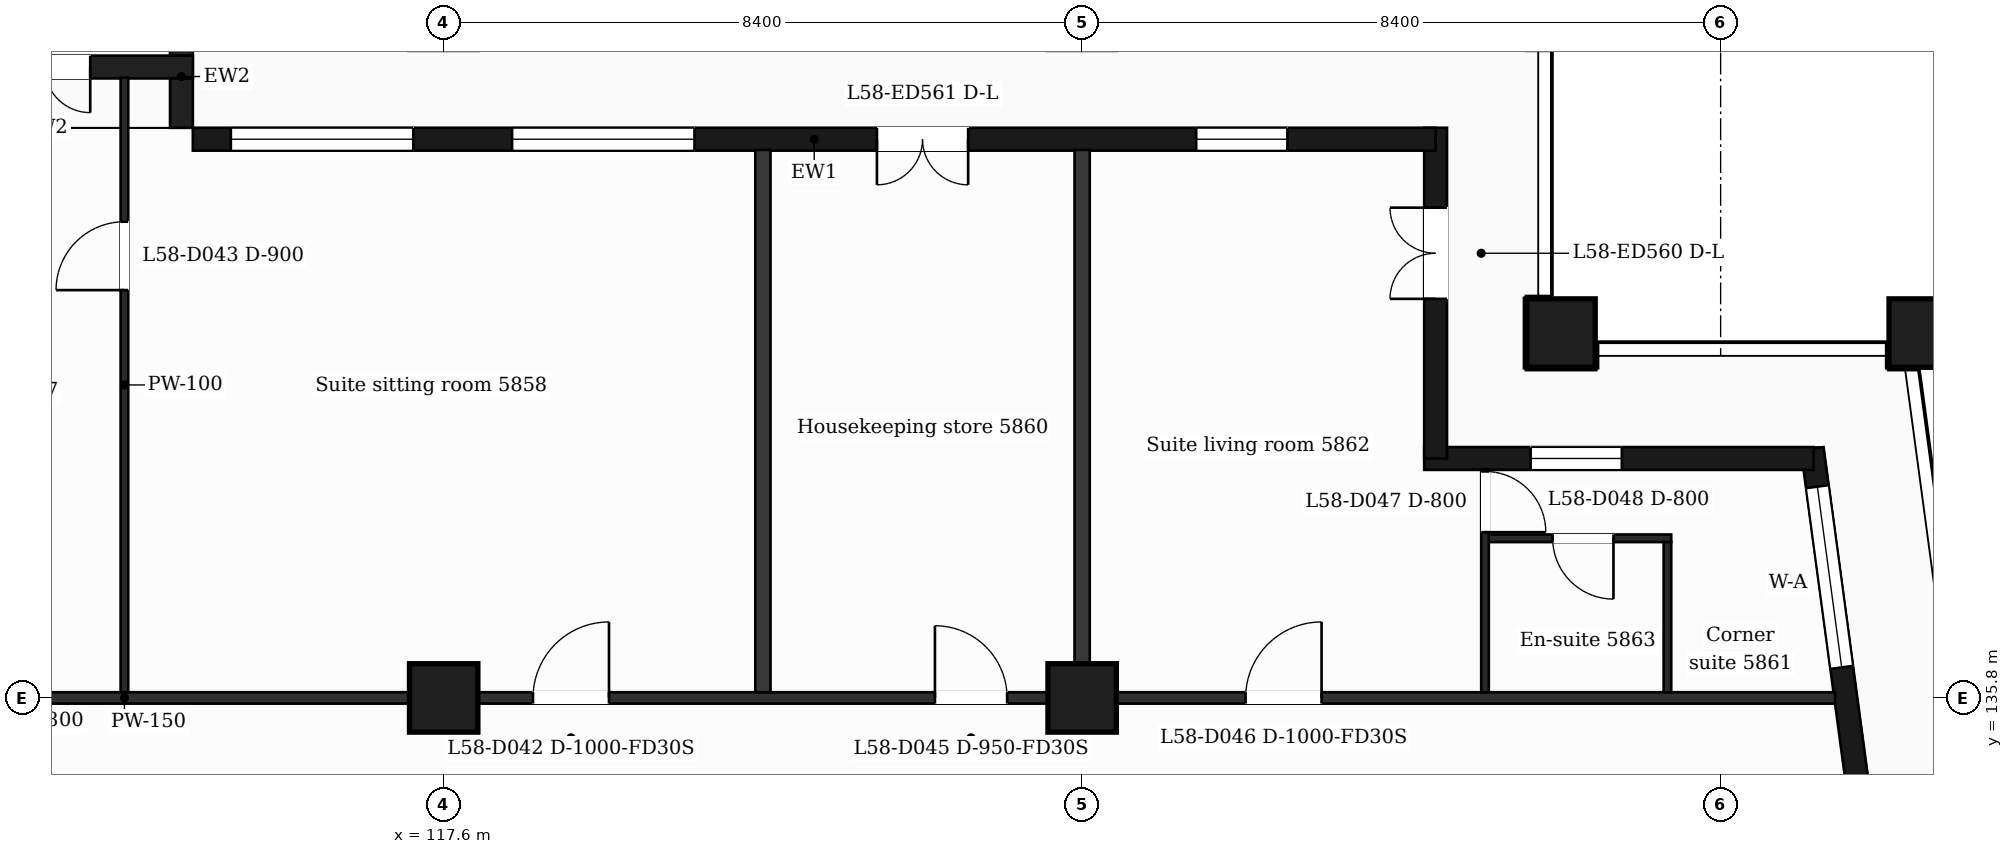
"""IFC4 building model, lengths in metres.
Left out: names, types, materials, properties, quantities, classifications, styles, units other than length and angle.
Written with IfcOpenShell. Run it as: python <this file> out.ifc"""

import sys

from ifc_helpers import new_model, si_unit, direction, frame, frame_2d, origin, origin_2d, place, context, subcontext, project, spatial, rectangle, extrude, element, fill, save


model = new_model("IFC4")
c1 = context("Model", 3, precision=1e-05, world=origin(), true_north=direction((0.0, 1.0)))
c2 = subcontext(c1, "Body", "Model", "MODEL_VIEW")
j1 = project(units=[si_unit("LENGTHUNIT", "METRE"), si_unit("PLANEANGLEUNIT", "RADIAN")], contexts=[c1])
p1 = place(None, origin())
s1 = spatial("IfcSite", under=j1, at=p1, CompositionType="ELEMENT")
p2 = place(p1, origin())
s2 = spatial("IfcBuilding", under=s1, at=p2, CompositionType="ELEMENT")
p3 = place(p2, frame((0.0, 0.0, 239.2)))
s3 = spatial("IfcBuildingStorey", under=s2, at=p3, CompositionType="ELEMENT", Elevation=239.2)
for number, where, z_axis, x_axis in (
    (1, (132.3, 140.6, 0.0), (0.0, 0.0, 1.0), (1.0, 0.0, 0.0)),
    (2, (137.065, 140.6, 0.0), (0.0, 0.0, 1.0), (1.0, 0.0, 0.0)),
    (3, (117.6, 135.8, 0.0), (0.0, 0.0, 1.0), (1.0, 0.0, 0.0)),
    (4, (126.0, 135.8, 0.0), (0.0, 0.0, 1.0), (1.0, 0.0, 0.0)),
):
    element("IfcColumn", number, at=place(p3, frame(where, z_axis=z_axis, x_axis=x_axis)), inside=s3, PredefinedType="COLUMN", context=c2, shape_type="SweptSolid", body=[
        extrude(rectangle(XDim=0.9, YDim=0.9, at=origin_2d()), origin(), (0.0, 0.0, 1.0), 3.7),
    ])
p4 = place(p3, frame((136.504, 132.4, 0.0), z_axis=(0.0, 0.0, 1.0), x_axis=(-0.133399697462, 0.99106231929, 0.0)))
e5 = element("IfcWall", 5, at=p4, inside=s3, PredefinedType="SOLIDWALL", context=c2, shape_type="SweptSolid", body=[
    extrude(rectangle(XDim=6.74, YDim=0.3, at=frame_2d((3.37, 0.0))), origin(), (0.0, 0.0, 1.0), 3.38),
])
p5 = place(p4, frame((1.115, 0.0, 0.0)))
e6 = element("IfcOpeningElement", 6, at=p5, cuts=e5, PredefinedType="OPENING", context=c2, shape_type="SweptSolid", body=[
    extrude(rectangle(XDim=1.2, YDim=2.4, at=frame_2d((0.6, 1.2))), frame((0.0, 0.16, 0.0), z_axis=(0.0, -1.0, 0.0), x_axis=(1.0, 0.0, 0.0)), (0.0, 0.0, 1.0), 0.32),
])
p6 = place(p4, frame((3.835, 0.0, 0.9)))
e7 = element("IfcOpeningElement", 7, at=p6, cuts=e5, PredefinedType="OPENING", context=c2, shape_type="SweptSolid", body=[
    extrude(rectangle(XDim=2.4, YDim=2.1, at=frame_2d((1.2, 1.05))), frame((0.0, 0.16, 0.0), z_axis=(0.0, -1.0, 0.0), x_axis=(1.0, 0.0, 0.0)), (0.0, 0.0, 1.0), 0.32),
])
p7 = place(p3, frame((135.623, 138.95, 0.0), z_axis=(0.0, 0.0, 1.0), x_axis=(-1.0, 0.0, 0.0)))
e8 = element("IfcWall", 8, at=p7, inside=s3, PredefinedType="SOLIDWALL", context=c2, shape_type="SweptSolid", body=[
    extrude(rectangle(XDim=5.123, YDim=0.3, at=frame_2d((2.561, 0.0))), origin(), (0.0, 0.0, 1.0), 3.38),
])
p8 = place(p7, frame((2.523, 0.0, 0.9)))
e9 = element("IfcOpeningElement", 9, at=p8, cuts=e8, PredefinedType="OPENING", context=c2, shape_type="SweptSolid", body=[
    extrude(rectangle(XDim=1.2, YDim=2.1, at=frame_2d((0.6, 1.05))), frame((0.0, 0.16, 0.0), z_axis=(0.0, -1.0, 0.0), x_axis=(1.0, 0.0, 0.0)), (0.0, 0.0, 1.0), 0.32),
])
p9 = place(p3, frame((130.65, 138.95, 0.0), z_axis=(0.0, 0.0, 1.0), x_axis=(0.0, 1.0, 0.0)))
e10 = element("IfcWall", 10, at=p9, inside=s3, PredefinedType="SOLIDWALL", context=c2, shape_type="SweptSolid", body=[
    extrude(rectangle(XDim=4.35, YDim=0.3, at=frame_2d((2.175, 0.0))), origin(), (0.0, 0.0, 1.0), 3.38),
])
p10 = place(p9, frame((2.1, 0.0, 0.0)))
e11 = element("IfcOpeningElement", 11, at=p10, cuts=e10, PredefinedType="OPENING", context=c2, shape_type="SweptSolid", body=[
    extrude(rectangle(XDim=1.2, YDim=2.4, at=frame_2d((0.6, 1.2))), frame((0.0, 0.16, 0.0), z_axis=(0.0, -1.0, 0.0), x_axis=(1.0, 0.0, 0.0)), (0.0, 0.0, 1.0), 0.32),
])
p11 = place(p3, frame((130.65, 143.15, 0.0), z_axis=(0.0, 0.0, 1.0), x_axis=(-1.0, 0.0, 0.0)))
e12 = element("IfcWall", 12, at=p11, inside=s3, PredefinedType="SOLIDWALL", context=c2, shape_type="SweptSolid", body=[
    extrude(rectangle(XDim=16.35, YDim=0.3, at=frame_2d((8.175, 0.0))), origin(), (0.0, 0.0, 1.0), 3.38),
])
p12 = place(p11, frame((1.95, 0.0, 0.9)))
e13 = element("IfcOpeningElement", 13, at=p12, cuts=e12, PredefinedType="OPENING", context=c2, shape_type="SweptSolid", body=[
    extrude(rectangle(XDim=1.2, YDim=2.1, at=frame_2d((0.6, 1.05))), frame((0.0, 0.16, 0.0), z_axis=(0.0, -1.0, 0.0), x_axis=(1.0, 0.0, 0.0)), (0.0, 0.0, 1.0), 0.32),
])
p13 = place(p11, frame((6.15, 0.0, 0.0)))
e14 = element("IfcOpeningElement", 14, at=p13, cuts=e12, PredefinedType="OPENING", context=c2, shape_type="SweptSolid", body=[
    extrude(rectangle(XDim=1.2, YDim=2.4, at=frame_2d((0.6, 1.2))), frame((0.0, 0.16, 0.0), z_axis=(0.0, -1.0, 0.0), x_axis=(1.0, 0.0, 0.0)), (0.0, 0.0, 1.0), 0.32),
])
p14 = place(p11, frame((9.75, 0.0, 0.9)))
e15 = element("IfcOpeningElement", 15, at=p14, cuts=e12, PredefinedType="OPENING", context=c2, shape_type="SweptSolid", body=[
    extrude(rectangle(XDim=2.4, YDim=2.1, at=frame_2d((1.2, 1.05))), frame((0.0, 0.16, 0.0), z_axis=(0.0, -1.0, 0.0), x_axis=(1.0, 0.0, 0.0)), (0.0, 0.0, 1.0), 0.32),
])
p15 = place(p11, frame((13.45, 0.0, 0.9)))
e16 = element("IfcOpeningElement", 16, at=p15, cuts=e12, PredefinedType="OPENING", context=c2, shape_type="SweptSolid", body=[
    extrude(rectangle(XDim=2.4, YDim=2.1, at=frame_2d((1.2, 1.05))), frame((0.0, 0.16, 0.0), z_axis=(0.0, -1.0, 0.0), x_axis=(1.0, 0.0, 0.0)), (0.0, 0.0, 1.0), 0.32),
])
p16 = place(p3, frame((114.15, 143.3, 0.0), z_axis=(0.0, 0.0, 1.0), x_axis=(0.0, 1.0, 0.0)))
e17 = element("IfcWall", 17, at=p16, inside=s3, PredefinedType="SOLIDWALL", context=c2, shape_type="SweptSolid", body=[
    extrude(rectangle(XDim=1.35, YDim=0.3, at=frame_2d((0.675, 0.0))), origin(), (0.0, 0.0, 1.0), 3.38),
])
p17 = place(p3, frame((114.3, 144.1, 0.0), z_axis=(0.0, 0.0, 1.0), x_axis=(-1.0, 0.0, 0.0)))
e18 = element("IfcWall", 18, at=p17, inside=s3, PredefinedType="SOLIDWALL", context=c2, shape_type="SweptSolid", body=[
    extrude(rectangle(XDim=3.9, YDim=0.3, at=frame_2d((1.95, 0.0))), origin(), (0.0, 0.0, 1.0), 3.38),
])
p18 = place(p17, frame((1.35, 0.0, 0.0)))
e19 = element("IfcOpeningElement", 19, at=p18, cuts=e18, PredefinedType="OPENING", context=c2, shape_type="SweptSolid", body=[
    extrude(rectangle(XDim=1.2, YDim=2.4, at=frame_2d((0.6, 1.2))), frame((0.0, 0.16, 0.0), z_axis=(0.0, -1.0, 0.0), x_axis=(1.0, 0.0, 0.0)), (0.0, 0.0, 1.0), 0.32),
])
p19 = place(p3, frame((90.895, 135.8, 0.0), z_axis=(0.0, 0.0, 1.0), x_axis=(1.0, 0.0, 0.0)))
e20 = element("IfcWall", 20, at=p19, inside=s3, PredefinedType="PARTITIONING", context=c2, shape_type="SweptSolid", body=[
    extrude(rectangle(XDim=45.011, YDim=0.15, at=frame_2d((22.505, 0.0))), origin(), (0.0, 0.0, 1.0), 3.38),
])
p20 = place(p19, frame((7.455, 0.0, 0.0)))
e21 = element("IfcOpeningElement", 21, at=p20, cuts=e20, PredefinedType="OPENING", context=c2, shape_type="SweptSolid", body=[
    extrude(rectangle(XDim=1.0, YDim=2.1, at=frame_2d((0.5, 1.05))), frame((0.0, 0.085, 0.0), z_axis=(0.0, -1.0, 0.0), x_axis=(1.0, 0.0, 0.0)), (0.0, 0.0, 1.0), 0.17),
])
p21 = place(p19, frame((10.88, 0.0, 0.0)))
e22 = element("IfcOpeningElement", 22, at=p21, cuts=e20, PredefinedType="OPENING", context=c2, shape_type="SweptSolid", body=[
    extrude(rectangle(XDim=1.0, YDim=2.1, at=frame_2d((0.5, 1.05))), frame((0.0, 0.085, 0.0), z_axis=(0.0, -1.0, 0.0), x_axis=(1.0, 0.0, 0.0)), (0.0, 0.0, 1.0), 0.17),
])
p22 = place(p19, frame((27.88, 0.0, 0.0)))
e23 = element("IfcOpeningElement", 23, at=p22, cuts=e20, PredefinedType="OPENING", context=c2, shape_type="SweptSolid", body=[
    extrude(rectangle(XDim=1.0, YDim=2.1, at=frame_2d((0.5, 1.05))), frame((0.0, 0.085, 0.0), z_axis=(0.0, -1.0, 0.0), x_axis=(1.0, 0.0, 0.0)), (0.0, 0.0, 1.0), 0.17),
])
p23 = place(p19, frame((33.168, 0.0, 0.0)))
e24 = element("IfcOpeningElement", 24, at=p23, cuts=e20, PredefinedType="OPENING", context=c2, shape_type="SweptSolid", body=[
    extrude(rectangle(XDim=0.95, YDim=2.1, at=frame_2d((0.475, 1.05))), frame((0.0, 0.085, 0.0), z_axis=(0.0, -1.0, 0.0), x_axis=(1.0, 0.0, 0.0)), (0.0, 0.0, 1.0), 0.17),
])
p24 = place(p19, frame((37.255, 0.0, 0.0)))
e25 = element("IfcOpeningElement", 25, at=p24, cuts=e20, PredefinedType="OPENING", context=c2, shape_type="SweptSolid", body=[
    extrude(rectangle(XDim=1.0, YDim=2.1, at=frame_2d((0.5, 1.05))), frame((0.0, 0.085, 0.0), z_axis=(0.0, -1.0, 0.0), x_axis=(1.0, 0.0, 0.0)), (0.0, 0.0, 1.0), 0.17),
])
p25 = place(p3, frame((131.3, 137.9, 0.0), z_axis=(0.0, 0.0, 1.0), x_axis=(1.0, 0.0, 0.0)))
e26 = element("IfcWall", 26, at=p25, inside=s3, PredefinedType="PARTITIONING", context=c2, shape_type="SweptSolid", body=[
    extrude(rectangle(XDim=2.45, YDim=0.1, at=frame_2d((1.225, 0.0))), origin(), (0.0, 0.0, 1.0), 3.38),
])
p26 = place(p25, frame((0.89, 0.0, 0.0)))
e27 = element("IfcOpeningElement", 27, at=p26, cuts=e26, PredefinedType="OPENING", context=c2, shape_type="SweptSolid", body=[
    extrude(rectangle(XDim=0.8, YDim=2.1, at=frame_2d((0.4, 1.05))), frame((0.0, 0.06, 0.0), z_axis=(0.0, -1.0, 0.0), x_axis=(1.0, 0.0, 0.0)), (0.0, 0.0, 1.0), 0.12),
])
p27 = place(p3, frame((113.4, 135.875, 0.0), z_axis=(0.0, 0.0, 1.0), x_axis=(0.0, 1.0, 0.0)))
e28 = element("IfcWall", 28, at=p27, inside=s3, PredefinedType="PARTITIONING", context=c2, shape_type="SweptSolid", body=[
    extrude(rectangle(XDim=8.085, YDim=0.1, at=frame_2d((4.042, 0.0))), origin(), (0.0, 0.0, 1.0), 3.38),
])
p28 = place(p27, frame((5.29, 0.0, 0.0)))
e29 = element("IfcOpeningElement", 29, at=p28, cuts=e28, PredefinedType="OPENING", context=c2, shape_type="SweptSolid", body=[
    extrude(rectangle(XDim=0.9, YDim=2.1, at=frame_2d((0.45, 1.05))), frame((0.0, 0.06, 0.0), z_axis=(0.0, -1.0, 0.0), x_axis=(1.0, 0.0, 0.0)), (0.0, 0.0, 1.0), 0.12),
])
for number, where, z_axis, x_axis in (
    (30, (121.8, 135.875, 0.0), (0.0, 0.0, 1.0), (0.0, 1.0, 0.0)),
    (31, (126.0, 135.875, 0.0), (0.0, 0.0, 1.0), (0.0, 1.0, 0.0)),
):
    element("IfcWall", number, at=place(p3, frame(where, z_axis=z_axis, x_axis=x_axis)), inside=s3, PredefinedType="PARTITIONING", context=c2, shape_type="SweptSolid", body=[
        extrude(rectangle(XDim=7.135, YDim=0.2, at=frame_2d((3.567, 0.0))), origin(), (0.0, 0.0, 1.0), 3.38),
    ])
p29 = place(p3, frame((131.3, 135.875, 0.0), z_axis=(0.0, 0.0, 1.0), x_axis=(0.0, 1.0, 0.0)))
e32 = element("IfcWall", 32, at=p29, inside=s3, PredefinedType="PARTITIONING", context=c2, shape_type="SweptSolid", body=[
    extrude(rectangle(XDim=2.935, YDim=0.1, at=frame_2d((1.468, 0.0))), origin(), (0.0, 0.0, 1.0), 3.38),
])
p30 = place(p29, frame((2.105, 0.0, 0.0)))
e33 = element("IfcOpeningElement", 33, at=p30, cuts=e32, PredefinedType="OPENING", context=c2, shape_type="SweptSolid", body=[
    extrude(rectangle(XDim=0.8, YDim=2.1, at=frame_2d((0.4, 1.05))), frame((0.0, 0.06, 0.0), z_axis=(0.0, -1.0, 0.0), x_axis=(1.0, 0.0, 0.0)), (0.0, 0.0, 1.0), 0.12),
])
p31 = place(p3, frame((133.7, 135.875, 0.0), z_axis=(0.0, 0.0, 1.0), x_axis=(0.0, 1.0, 0.0)))
e34 = element("IfcWall", 34, at=p31, inside=s3, PredefinedType="PARTITIONING", context=c2, shape_type="SweptSolid", body=[
    extrude(rectangle(XDim=1.975, YDim=0.1, at=frame_2d((0.988, 0.0))), origin(), (0.0, 0.0, 1.0), 3.38),
])
p32 = place(p6, origin())
e35 = element("IfcWindow", 35, at=p32, inside=s3, PartitioningType="SINGLE_PANEL", PredefinedType="WINDOW", context=c2, shape_type="SweptSolid", body=[
    extrude(rectangle(XDim=2.4, YDim=2.1, at=frame_2d((1.2, 1.05))), frame((0.0, 0.03, 0.0), z_axis=(0.0, -1.0, 0.0), x_axis=(1.0, 0.0, 0.0)), (0.0, 0.0, 1.0), 0.06),
])
fill(e7, e35)
p33 = place(p8, origin())
e36 = element("IfcWindow", 36, at=p33, inside=s3, PartitioningType="SINGLE_PANEL", PredefinedType="WINDOW", context=c2, shape_type="SweptSolid", body=[
    extrude(rectangle(XDim=1.2, YDim=2.1, at=frame_2d((0.6, 1.05))), frame((0.0, 0.03, 0.0), z_axis=(0.0, -1.0, 0.0), x_axis=(1.0, 0.0, 0.0)), (0.0, 0.0, 1.0), 0.06),
])
fill(e9, e36)
p34 = place(p10, origin())
e37 = element("IfcDoor", 37, at=p34, inside=s3, OperationType="DOUBLE_DOOR_SINGLE_SWING", PredefinedType="DOOR", context=c2, shape_type="SweptSolid", body=[
    extrude(rectangle(XDim=1.2, YDim=2.4, at=frame_2d((0.6, 1.2))), frame((0.0, 0.025, 0.0), z_axis=(0.0, -1.0, 0.0), x_axis=(1.0, 0.0, 0.0)), (0.0, 0.0, 1.0), 0.05),
])
fill(e11, e37)
p35 = place(p12, origin())
e38 = element("IfcWindow", 38, at=p35, inside=s3, PartitioningType="SINGLE_PANEL", PredefinedType="WINDOW", context=c2, shape_type="SweptSolid", body=[
    extrude(rectangle(XDim=1.2, YDim=2.1, at=frame_2d((0.6, 1.05))), frame((0.0, 0.03, 0.0), z_axis=(0.0, -1.0, 0.0), x_axis=(1.0, 0.0, 0.0)), (0.0, 0.0, 1.0), 0.06),
])
fill(e13, e38)
p36 = place(p13, origin())
e39 = element("IfcDoor", 39, at=p36, inside=s3, OperationType="DOUBLE_DOOR_SINGLE_SWING", PredefinedType="DOOR", context=c2, shape_type="SweptSolid", body=[
    extrude(rectangle(XDim=1.2, YDim=2.4, at=frame_2d((0.6, 1.2))), frame((0.0, 0.025, 0.0), z_axis=(0.0, -1.0, 0.0), x_axis=(1.0, 0.0, 0.0)), (0.0, 0.0, 1.0), 0.05),
])
fill(e14, e39)
p37 = place(p14, origin())
e40 = element("IfcWindow", 40, at=p37, inside=s3, PartitioningType="SINGLE_PANEL", PredefinedType="WINDOW", context=c2, shape_type="SweptSolid", body=[
    extrude(rectangle(XDim=2.4, YDim=2.1, at=frame_2d((1.2, 1.05))), frame((0.0, 0.03, 0.0), z_axis=(0.0, -1.0, 0.0), x_axis=(1.0, 0.0, 0.0)), (0.0, 0.0, 1.0), 0.06),
])
fill(e15, e40)
p38 = place(p15, origin())
e41 = element("IfcWindow", 41, at=p38, inside=s3, PartitioningType="SINGLE_PANEL", PredefinedType="WINDOW", context=c2, shape_type="SweptSolid", body=[
    extrude(rectangle(XDim=2.4, YDim=2.1, at=frame_2d((1.2, 1.05))), frame((0.0, 0.03, 0.0), z_axis=(0.0, -1.0, 0.0), x_axis=(1.0, 0.0, 0.0)), (0.0, 0.0, 1.0), 0.06),
])
fill(e16, e41)
p39 = place(p18, origin())
e42 = element("IfcDoor", 42, at=p39, inside=s3, OperationType="DOUBLE_DOOR_SINGLE_SWING", PredefinedType="DOOR", context=c2, shape_type="SweptSolid", body=[
    extrude(rectangle(XDim=1.2, YDim=2.4, at=frame_2d((0.6, 1.2))), frame((0.0, 0.025, 0.0), z_axis=(0.0, -1.0, 0.0), x_axis=(1.0, 0.0, 0.0)), (0.0, 0.0, 1.0), 0.05),
])
fill(e19, e42)
p40 = place(p22, origin())
e43 = element("IfcDoor", 43, at=p40, inside=s3, OperationType="SINGLE_SWING_RIGHT", PredefinedType="DOOR", context=c2, shape_type="SweptSolid", body=[
    extrude(rectangle(XDim=1.0, YDim=2.1, at=frame_2d((0.5, 1.05))), frame((0.0, 0.025, 0.0), z_axis=(0.0, -1.0, 0.0), x_axis=(1.0, 0.0, 0.0)), (0.0, 0.0, 1.0), 0.05),
])
fill(e23, e43)
p41 = place(p28, origin())
e44 = element("IfcDoor", 44, at=p41, inside=s3, OperationType="SINGLE_SWING_LEFT", PredefinedType="DOOR", context=c2, shape_type="SweptSolid", body=[
    extrude(rectangle(XDim=0.9, YDim=2.1, at=frame_2d((0.45, 1.05))), frame((0.0, 0.025, 0.0), z_axis=(0.0, -1.0, 0.0), x_axis=(1.0, 0.0, 0.0)), (0.0, 0.0, 1.0), 0.05),
])
fill(e29, e44)
p42 = place(p23, origin())
e45 = element("IfcDoor", 45, at=p42, inside=s3, OperationType="SINGLE_SWING_LEFT", PredefinedType="DOOR", context=c2, shape_type="SweptSolid", body=[
    extrude(rectangle(XDim=0.95, YDim=2.1, at=frame_2d((0.475, 1.05))), frame((0.0, 0.025, 0.0), z_axis=(0.0, -1.0, 0.0), x_axis=(1.0, 0.0, 0.0)), (0.0, 0.0, 1.0), 0.05),
])
fill(e24, e45)
p43 = place(p24, origin())
e46 = element("IfcDoor", 46, at=p43, inside=s3, OperationType="SINGLE_SWING_RIGHT", PredefinedType="DOOR", context=c2, shape_type="SweptSolid", body=[
    extrude(rectangle(XDim=1.0, YDim=2.1, at=frame_2d((0.5, 1.05))), frame((0.0, 0.025, 0.0), z_axis=(0.0, -1.0, 0.0), x_axis=(1.0, 0.0, 0.0)), (0.0, 0.0, 1.0), 0.05),
])
fill(e25, e46)
p44 = place(p30, origin())
e47 = element("IfcDoor", 47, at=p44, inside=s3, OperationType="SINGLE_SWING_LEFT", PredefinedType="DOOR", context=c2, shape_type="SweptSolid", body=[
    extrude(rectangle(XDim=0.8, YDim=2.1, at=frame_2d((0.4, 1.05))), frame((0.0, 0.025, 0.0), z_axis=(0.0, -1.0, 0.0), x_axis=(1.0, 0.0, 0.0)), (0.0, 0.0, 1.0), 0.05),
])
fill(e33, e47)
p45 = place(p26, origin())
e48 = element("IfcDoor", 48, at=p45, inside=s3, OperationType="SINGLE_SWING_RIGHT", PredefinedType="DOOR", context=c2, shape_type="SweptSolid", body=[
    extrude(rectangle(XDim=0.8, YDim=2.1, at=frame_2d((0.4, 1.05))), frame((0.0, 0.025, 0.0), z_axis=(0.0, -1.0, 0.0), x_axis=(1.0, 0.0, 0.0)), (0.0, 0.0, 1.0), 0.05),
])
fill(e27, e48)
save(model, sys.argv[1])
